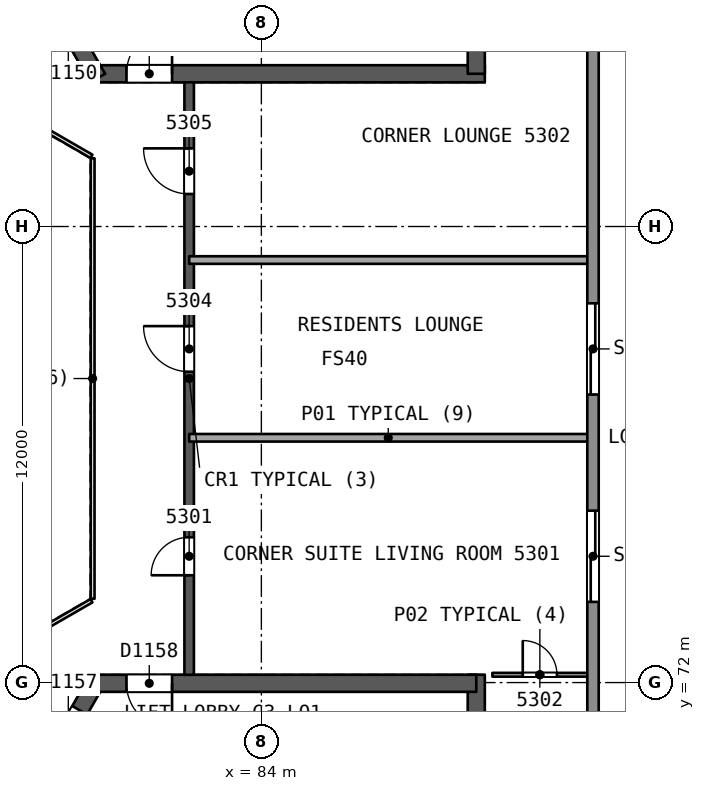
"""IFC4 building model, lengths in metres.
Left out: names, types, materials, properties, quantities, classifications, styles, units other than length and angle.
Written with IfcOpenShell. Run it as: python <this file> out.ifc"""

import sys

from ifc_helpers import new_model, si_unit, direction, frame, frame_2d, origin, place, context, subcontext, project, spatial, rectangle, extrude, element, fill, save


model = new_model("IFC4")
c1 = context("Model", 3, precision=1e-05, world=origin(), true_north=direction((0.0, 1.0)))
c2 = subcontext(c1, "Body", "Model", "MODEL_VIEW")
j1 = project(units=[si_unit("LENGTHUNIT", "METRE"), si_unit("PLANEANGLEUNIT", "RADIAN")], contexts=[c1])
p1 = place(None, origin())
s1 = spatial("IfcSite", under=j1, at=p1, CompositionType="ELEMENT")
p2 = place(p1, origin())
s2 = spatial("IfcBuilding", under=s1, at=p2, CompositionType="ELEMENT")
p3 = place(p2, frame((0.0, 0.0, 216.9)))
s3 = spatial("IfcBuildingStorey", under=s2, at=p3, CompositionType="ELEMENT", Elevation=216.9)
p4 = place(p3, frame((79.63, 88.019, 0.0), z_axis=(0.0, 0.0, 1.0), x_axis=(1.0, 0.0, 0.0)))
e1 = element("IfcWall", 1, at=p4, inside=s3, PredefinedType="SHEAR", context=c2, shape_type="SweptSolid", body=[
    extrude(rectangle(XDim=10.25, YDim=0.45, at=frame_2d((5.125, 0.0))), origin(), (0.0, 0.0, 1.0), 3.7),
])
p5 = place(p4, frame((0.82, 0.0, 0.0)))
e2 = element("IfcOpeningElement", 2, at=p5, cuts=e1, PredefinedType="OPENING", context=c2, shape_type="SweptSolid", body=[
    extrude(rectangle(XDim=1.2, YDim=2.1, at=frame_2d((0.6, 1.05))), frame((0.0, 0.235, 0.0), z_axis=(0.0, -1.0, 0.0), x_axis=(1.0, 0.0, 0.0)), (0.0, 0.0, 1.0), 0.471),
])
p6 = place(p3, frame((89.655, 88.019, 0.0), z_axis=(0.0, 0.0, 1.0), x_axis=(0.0, 1.0, 0.0)))
e3 = element("IfcWall", 3, at=p6, inside=s3, PredefinedType="SHEAR", context=c2, shape_type="SweptSolid", body=[
    extrude(rectangle(XDim=14.108, YDim=0.45, at=frame_2d((7.054, 0.0))), origin(), (0.0, 0.0, 1.0), 3.7),
])
p7 = place(p3, frame((74.617, 96.701, 0.0), z_axis=(0.0, 0.0, 1.0), x_axis=(0.499994385119, -0.866028645513, 0.0)))
e4 = element("IfcWall", 4, at=p7, inside=s3, PredefinedType="SHEAR", context=c2, shape_type="SweptSolid", body=[
    extrude(rectangle(XDim=10.155, YDim=0.45, at=frame_2d((5.077, 0.0))), origin(), (0.0, 0.0, 1.0), 3.7),
])
p8 = place(p7, frame((8.005, 0.0, 0.0)))
e5 = element("IfcOpeningElement", 5, at=p8, cuts=e4, PredefinedType="OPENING", context=c2, shape_type="SweptSolid", body=[
    extrude(rectangle(XDim=1.2, YDim=2.1, at=frame_2d((0.6, 1.05))), frame((0.0, 0.235, 0.0), z_axis=(0.0, -1.0, 0.0), x_axis=(1.0, 0.0, 0.0)), (0.0, 0.0, 1.0), 0.471),
])
p9 = place(p3, frame((79.63, 71.981, 0.0), z_axis=(0.0, 0.0, 1.0), x_axis=(-0.500002171595, -0.86602415001, 0.0)))
e6 = element("IfcWall", 6, at=p9, inside=s3, PredefinedType="SHEAR", context=c2, shape_type="SweptSolid", body=[
    extrude(rectangle(XDim=10.25, YDim=0.45, at=frame_2d((5.125, 0.0))), origin(), (0.0, 0.0, 1.0), 3.7),
])
p10 = place(p9, frame((0.82, 0.0, 0.0)))
e7 = element("IfcOpeningElement", 7, at=p10, cuts=e6, PredefinedType="OPENING", context=c2, shape_type="SweptSolid", body=[
    extrude(rectangle(XDim=1.2, YDim=2.1, at=frame_2d((0.6, 1.05))), frame((0.0, 0.235, 0.0), z_axis=(0.0, -1.0, 0.0), x_axis=(1.0, 0.0, 0.0)), (0.0, 0.0, 1.0), 0.471),
])
p11 = place(p3, frame((89.655, 58.002, 0.0), z_axis=(0.0, 0.0, 1.0), x_axis=(0.0, 1.0, 0.0)))
e8 = element("IfcWall", 8, at=p11, inside=s3, PredefinedType="SHEAR", context=c2, shape_type="SweptSolid", body=[
    extrude(rectangle(XDim=14.204, YDim=0.45, at=frame_2d((7.102, 0.0))), origin(), (0.0, 0.0, 1.0), 3.7),
])
p12 = place(p3, frame((89.655, 71.981, 0.0), z_axis=(0.0, 0.0, 1.0), x_axis=(-1.0, 0.0, 0.0)))
e9 = element("IfcWall", 9, at=p12, inside=s3, PredefinedType="SHEAR", context=c2, shape_type="SweptSolid", body=[
    extrude(rectangle(XDim=10.155, YDim=0.45, at=frame_2d((5.078, 0.0))), origin(), (0.0, 0.0, 1.0), 3.7),
])
p13 = place(p12, frame((8.005, 0.0, 0.0)))
e10 = element("IfcOpeningElement", 10, at=p13, cuts=e9, PredefinedType="OPENING", context=c2, shape_type="SweptSolid", body=[
    extrude(rectangle(XDim=1.2, YDim=2.1, at=frame_2d((0.6, 1.05))), frame((0.0, 0.235, 0.0), z_axis=(0.0, -1.0, 0.0), x_axis=(1.0, 0.0, 0.0)), (0.0, 0.0, 1.0), 0.471),
])
p14 = place(p3, frame((82.1, 72.206, 0.0), z_axis=(0.0, 0.0, 1.0), x_axis=(0.0, 1.0, 0.0)))
e11 = element("IfcWall", 11, at=p14, inside=s3, PredefinedType="SHEAR", context=c2, shape_type="SweptSolid", body=[
    extrude(rectangle(XDim=15.588, YDim=0.25, at=frame_2d((7.794, 0.0))), origin(), (0.0, 0.0, 1.0), 3.3),
])
p15 = place(p14, frame((2.618, 0.0, 0.0)))
e12 = element("IfcOpeningElement", 12, at=p15, cuts=e11, PredefinedType="OPENING", context=c2, shape_type="SweptSolid", body=[
    extrude(rectangle(XDim=1.0, YDim=2.1, at=frame_2d((0.5, 1.05))), frame((0.0, 0.135, 0.0), z_axis=(0.0, -1.0, 0.0), x_axis=(1.0, 0.0, 0.0)), (0.0, 0.0, 1.0), 0.271),
])
p16 = place(p14, frame((7.974, 0.0, 0.0)))
e13 = element("IfcOpeningElement", 13, at=p16, cuts=e11, PredefinedType="OPENING", context=c2, shape_type="SweptSolid", body=[
    extrude(rectangle(XDim=1.2, YDim=2.4, at=frame_2d((0.6, 1.2))), frame((0.0, 0.135, 0.0), z_axis=(0.0, -1.0, 0.0), x_axis=(1.0, 0.0, 0.0)), (0.0, 0.0, 1.0), 0.271),
])
p17 = place(p14, frame((12.65, 0.0, 0.0)))
e14 = element("IfcOpeningElement", 14, at=p17, cuts=e11, PredefinedType="OPENING", context=c2, shape_type="SweptSolid", body=[
    extrude(rectangle(XDim=1.2, YDim=2.4, at=frame_2d((0.6, 1.2))), frame((0.0, 0.135, 0.0), z_axis=(0.0, -1.0, 0.0), x_axis=(1.0, 0.0, 0.0)), (0.0, 0.0, 1.0), 0.271),
])
p18 = place(p3, frame((90.079, 72.206, 0.0), z_axis=(0.0, 0.0, 1.0), x_axis=(1.0, 0.0, 0.0)))
e15 = element("IfcWall", 15, at=p18, inside=s3, PredefinedType="PARTITIONING", context=c2, shape_type="SweptSolid", body=[
    extrude(rectangle(XDim=2.499, YDim=0.1, at=frame_2d((1.249, 0.0))), origin(), (0.0, 0.0, 1.0), 3.3),
])
p19 = place(p18, frame((0.799, 0.0, 0.0)))
e16 = element("IfcOpeningElement", 16, at=p19, cuts=e15, PredefinedType="OPENING", context=c2, shape_type="SweptSolid", body=[
    extrude(rectangle(XDim=0.9, YDim=2.1, at=frame_2d((0.45, 1.05))), frame((0.0, 0.061, 0.0), z_axis=(0.0, -1.0, 0.0), x_axis=(1.0, 0.0, 0.0)), (0.0, 0.0, 1.0), 0.121),
])
for number, where, z_axis, x_axis in (
    (17, (92.578, 78.441, 0.0), (0.0, 0.0, 1.0), (-1.0, 0.0, 0.0)),
    (18, (92.578, 83.118, 0.0), (0.0, 0.0, 1.0), (-1.0, 0.0, 0.0)),
):
    element("IfcWall", number, at=place(p3, frame(where, z_axis=z_axis, x_axis=x_axis)), inside=s3, PredefinedType="PARTITIONING", context=c2, shape_type="SweptSolid", body=[
        extrude(rectangle(XDim=10.478, YDim=0.2, at=frame_2d((5.239, 0.0))), origin(), (0.0, 0.0, 1.0), 3.3),
    ])
p20 = place(p3, frame((92.727, 105.489, 0.0), z_axis=(0.0, 0.0, 1.0), x_axis=(0.0, -1.0, 0.0)))
e19 = element("IfcWall", 19, at=p20, inside=s3, PredefinedType="SOLIDWALL", context=c2, shape_type="SweptSolid", body=[
    extrude(rectangle(XDim=50.977, YDim=0.3, at=frame_2d((25.489, 0.0))), origin(), (0.0, 0.0, 1.0), 3.3),
])
p21 = place(p20, frame((9.942, 0.0, 0.0)))
e20 = element("IfcOpeningElement", 20, at=p21, cuts=e19, PredefinedType="OPENING", context=c2, shape_type="SweptSolid", body=[
    extrude(rectangle(XDim=2.4, YDim=2.4, at=frame_2d((1.2, 1.2))), frame((0.0, 0.161, 0.0), z_axis=(0.0, -1.0, 0.0), x_axis=(1.0, 0.0, 0.0)), (0.0, 0.0, 1.0), 0.321),
])
p22 = place(p20, frame((28.965, 0.0, 0.0)))
e21 = element("IfcOpeningElement", 21, at=p22, cuts=e19, PredefinedType="OPENING", context=c2, shape_type="SweptSolid", body=[
    extrude(rectangle(XDim=2.4, YDim=2.4, at=frame_2d((1.2, 1.2))), frame((0.0, 0.161, 0.0), z_axis=(0.0, -1.0, 0.0), x_axis=(1.0, 0.0, 0.0)), (0.0, 0.0, 1.0), 0.321),
])
p23 = place(p20, frame((39.656, 0.0, 0.0)))
e22 = element("IfcOpeningElement", 22, at=p23, cuts=e19, PredefinedType="OPENING", context=c2, shape_type="SweptSolid", body=[
    extrude(rectangle(XDim=2.4, YDim=2.4, at=frame_2d((1.2, 1.2))), frame((0.0, 0.161, 0.0), z_axis=(0.0, -1.0, 0.0), x_axis=(1.0, 0.0, 0.0)), (0.0, 0.0, 1.0), 0.321),
])
p24 = place(p20, frame((23.509, 0.0, 0.0)))
e23 = element("IfcOpeningElement", 23, at=p24, cuts=e19, PredefinedType="OPENING", context=c2, shape_type="SweptSolid", body=[
    extrude(rectangle(XDim=2.4, YDim=2.4, at=frame_2d((1.2, 1.2))), frame((0.0, 0.161, 0.0), z_axis=(0.0, -1.0, 0.0), x_axis=(1.0, 0.0, 0.0)), (0.0, 0.0, 1.0), 0.321),
])
p25 = place(p3, frame((44.063, 82.607, 0.0), z_axis=(0.0, 0.0, 1.0), x_axis=(0.866024402399, 0.500001734447, 0.0)))
e24 = element("IfcWall", 24, at=p25, inside=s3, PredefinedType="SOLIDWALL", context=c2, shape_type="SweptSolid", body=[
    extrude(rectangle(XDim=50.977, YDim=0.3, at=frame_2d((25.488, 0.0))), origin(), (0.0, 0.0, 1.0), 3.3),
])
p26 = place(p25, frame((24.444, 0.0, 0.0)))
e25 = element("IfcOpeningElement", 25, at=p26, cuts=e24, PredefinedType="OPENING", context=c2, shape_type="SweptSolid", body=[
    extrude(rectangle(XDim=2.4, YDim=2.4, at=frame_2d((1.2, 1.2))), frame((0.0, 0.161, 0.0), z_axis=(0.0, -1.0, 0.0), x_axis=(1.0, 0.0, 0.0)), (0.0, 0.0, 1.0), 0.321),
])
p27 = place(p25, frame((29.121, 0.0, 0.0)))
e26 = element("IfcOpeningElement", 26, at=p27, cuts=e24, PredefinedType="OPENING", context=c2, shape_type="SweptSolid", body=[
    extrude(rectangle(XDim=2.4, YDim=2.4, at=frame_2d((1.2, 1.2))), frame((0.0, 0.161, 0.0), z_axis=(0.0, -1.0, 0.0), x_axis=(1.0, 0.0, 0.0)), (0.0, 0.0, 1.0), 0.321),
])
p28 = place(p25, frame((39.656, 0.0, 0.0)))
e27 = element("IfcOpeningElement", 27, at=p28, cuts=e24, PredefinedType="OPENING", context=c2, shape_type="SweptSolid", body=[
    extrude(rectangle(XDim=2.4, YDim=2.4, at=frame_2d((1.2, 1.2))), frame((0.0, 0.161, 0.0), z_axis=(0.0, -1.0, 0.0), x_axis=(1.0, 0.0, 0.0)), (0.0, 0.0, 1.0), 0.321),
])
p29 = place(p25, frame((19.612, 0.0, 0.0)))
e28 = element("IfcOpeningElement", 28, at=p29, cuts=e24, PredefinedType="OPENING", context=c2, shape_type="SweptSolid", body=[
    extrude(rectangle(XDim=2.4, YDim=2.4, at=frame_2d((1.2, 1.2))), frame((0.0, 0.161, 0.0), z_axis=(0.0, -1.0, 0.0), x_axis=(1.0, 0.0, 0.0)), (0.0, 0.0, 1.0), 0.321),
])
p30 = place(p25, frame((8.885, 0.0, 0.0)))
e29 = element("IfcOpeningElement", 29, at=p30, cuts=e24, PredefinedType="OPENING", context=c2, shape_type="SweptSolid", body=[
    extrude(rectangle(XDim=2.4, YDim=2.4, at=frame_2d((1.2, 1.2))), frame((0.0, 0.161, 0.0), z_axis=(0.0, -1.0, 0.0), x_axis=(1.0, 0.0, 0.0)), (0.0, 0.0, 1.0), 0.321),
])
p31 = place(p3, frame((88.21, 51.904, 0.0), z_axis=(0.0, 0.0, 1.0), x_axis=(-0.866024402399, 0.500001734447, 0.0)))
e30 = element("IfcWall", 30, at=p31, inside=s3, PredefinedType="SOLIDWALL", context=c2, shape_type="SweptSolid", body=[
    extrude(rectangle(XDim=50.977, YDim=0.3, at=frame_2d((25.488, 0.0))), origin(), (0.0, 0.0, 1.0), 3.3),
])
p32 = place(p31, frame((24.756, 0.0, 0.0)))
e31 = element("IfcOpeningElement", 31, at=p32, cuts=e30, PredefinedType="OPENING", context=c2, shape_type="SweptSolid", body=[
    extrude(rectangle(XDim=2.4, YDim=2.4, at=frame_2d((1.2, 1.2))), frame((0.0, 0.161, 0.0), z_axis=(0.0, -1.0, 0.0), x_axis=(1.0, 0.0, 0.0)), (0.0, 0.0, 1.0), 0.321),
])
p33 = place(p31, frame((19.612, 0.0, 0.0)))
e32 = element("IfcOpeningElement", 32, at=p33, cuts=e30, PredefinedType="OPENING", context=c2, shape_type="SweptSolid", body=[
    extrude(rectangle(XDim=2.4, YDim=2.4, at=frame_2d((1.2, 1.2))), frame((0.0, 0.161, 0.0), z_axis=(0.0, -1.0, 0.0), x_axis=(1.0, 0.0, 0.0)), (0.0, 0.0, 1.0), 0.321),
])
p34 = place(p31, frame((8.885, 0.0, 0.0)))
e33 = element("IfcOpeningElement", 33, at=p34, cuts=e30, PredefinedType="OPENING", context=c2, shape_type="SweptSolid", body=[
    extrude(rectangle(XDim=2.4, YDim=2.4, at=frame_2d((1.2, 1.2))), frame((0.0, 0.161, 0.0), z_axis=(0.0, -1.0, 0.0), x_axis=(1.0, 0.0, 0.0)), (0.0, 0.0, 1.0), 0.321),
])
p35 = place(p31, frame((38.323, 0.0, 0.0)))
e34 = element("IfcOpeningElement", 34, at=p35, cuts=e30, PredefinedType="OPENING", context=c2, shape_type="SweptSolid", body=[
    extrude(rectangle(XDim=2.4, YDim=2.4, at=frame_2d((1.2, 1.2))), frame((0.0, 0.161, 0.0), z_axis=(0.0, -1.0, 0.0), x_axis=(1.0, 0.0, 0.0)), (0.0, 0.0, 1.0), 0.321),
])
p36 = place(p3, frame((79.56, 74.206, 0.0), z_axis=(0.0, 0.0, 1.0), x_axis=(0.0, 1.0, 0.0)))
e35 = element("IfcWall", 35, at=p36, inside=s3, PredefinedType="PARTITIONING", context=c2, shape_type="SweptSolid", body=[
    extrude(rectangle(XDim=11.588, YDim=0.1, at=frame_2d((5.794, 0.0))), origin(), (0.0, 0.0, 1.0), 3.3),
])
for number, where, z_axis, x_axis in (
    (36, (79.53, 85.846, 0.0), (0.0, 0.0, 1.0), (-0.866, 0.5, 0.0)),
    (37, (77.798, 73.154, 0.0), (0.0, 0.0, 1.0), (0.866, 0.5, 0.0)),
):
    element("IfcWall", number, at=place(p3, frame(where, z_axis=z_axis, x_axis=x_axis)), inside=s3, PredefinedType="PARTITIONING", context=c2, shape_type="SweptSolid", body=[
        extrude(rectangle(XDim=2.0, YDim=0.1, at=frame_2d((1.0, 0.0))), origin(), (0.0, 0.0, 1.0), 3.3),
    ])
p37 = place(p15, origin())
e38 = element("IfcDoor", 38, at=p37, inside=s3, OperationType="SINGLE_SWING_LEFT", PredefinedType="NOTDEFINED", context=c2, shape_type="SweptSolid", body=[
    extrude(rectangle(XDim=1.0, YDim=2.1, at=frame_2d((0.5, 1.05))), frame((0.0, 0.025, 0.0), z_axis=(0.0, -1.0, 0.0), x_axis=(1.0, 0.0, 0.0)), (0.0, 0.0, 1.0), 0.05),
])
fill(e12, e38)
p38 = place(p19, origin())
e39 = element("IfcDoor", 39, at=p38, inside=s3, OperationType="SINGLE_SWING_LEFT", PredefinedType="NOTDEFINED", context=c2, shape_type="SweptSolid", body=[
    extrude(rectangle(XDim=0.9, YDim=2.1, at=frame_2d((0.45, 1.05))), frame((0.0, 0.025, 0.0), z_axis=(0.0, -1.0, 0.0), x_axis=(1.0, 0.0, 0.0)), (0.0, 0.0, 1.0), 0.05),
])
fill(e16, e39)
p39 = place(p16, origin())
e40 = element("IfcDoor", 40, at=p39, inside=s3, OperationType="SINGLE_SWING_RIGHT", PredefinedType="NOTDEFINED", context=c2, shape_type="SweptSolid", body=[
    extrude(rectangle(XDim=1.2, YDim=2.4, at=frame_2d((0.6, 1.2))), frame((0.0, 0.025, 0.0), z_axis=(0.0, -1.0, 0.0), x_axis=(1.0, 0.0, 0.0)), (0.0, 0.0, 1.0), 0.05),
])
fill(e13, e40)
p40 = place(p17, origin())
e41 = element("IfcDoor", 41, at=p40, inside=s3, OperationType="SINGLE_SWING_RIGHT", PredefinedType="NOTDEFINED", context=c2, shape_type="SweptSolid", body=[
    extrude(rectangle(XDim=1.2, YDim=2.4, at=frame_2d((0.6, 1.2))), frame((0.0, 0.025, 0.0), z_axis=(0.0, -1.0, 0.0), x_axis=(1.0, 0.0, 0.0)), (0.0, 0.0, 1.0), 0.05),
])
fill(e14, e41)
p41 = place(p22, origin())
e42 = element("IfcDoor", 42, at=p41, inside=s3, OperationType="SLIDING_TO_RIGHT", PredefinedType="NOTDEFINED", context=c2, shape_type="SweptSolid", body=[
    extrude(rectangle(XDim=2.4, YDim=2.4, at=frame_2d((1.2, 1.2))), frame((0.0, 0.025, 0.0), z_axis=(0.0, -1.0, 0.0), x_axis=(1.0, 0.0, 0.0)), (0.0, 0.0, 1.0), 0.05),
])
fill(e21, e42)
p42 = place(p24, origin())
e43 = element("IfcDoor", 43, at=p42, inside=s3, OperationType="SLIDING_TO_RIGHT", PredefinedType="NOTDEFINED", context=c2, shape_type="SweptSolid", body=[
    extrude(rectangle(XDim=2.4, YDim=2.4, at=frame_2d((1.2, 1.2))), frame((0.0, 0.025, 0.0), z_axis=(0.0, -1.0, 0.0), x_axis=(1.0, 0.0, 0.0)), (0.0, 0.0, 1.0), 0.05),
])
fill(e23, e43)
p43 = place(p5, origin())
e44 = element("IfcDoor", 44, at=p43, inside=s3, OperationType="SINGLE_SWING_RIGHT", PredefinedType="NOTDEFINED", context=c2, shape_type="SweptSolid", body=[
    extrude(rectangle(XDim=1.2, YDim=2.1, at=frame_2d((0.6, 1.05))), frame((0.0, 0.025, 0.0), z_axis=(0.0, -1.0, 0.0), x_axis=(1.0, 0.0, 0.0)), (0.0, 0.0, 1.0), 0.05),
])
fill(e2, e44)
p44 = place(p10, origin())
e45 = element("IfcDoor", 45, at=p44, inside=s3, OperationType="SINGLE_SWING_RIGHT", PredefinedType="NOTDEFINED", context=c2, shape_type="SweptSolid", body=[
    extrude(rectangle(XDim=1.2, YDim=2.1, at=frame_2d((0.6, 1.05))), frame((0.0, 0.025, 0.0), z_axis=(0.0, -1.0, 0.0), x_axis=(1.0, 0.0, 0.0)), (0.0, 0.0, 1.0), 0.05),
])
fill(e7, e45)
p45 = place(p13, origin())
e46 = element("IfcDoor", 46, at=p45, inside=s3, OperationType="SINGLE_SWING_LEFT", PredefinedType="NOTDEFINED", context=c2, shape_type="SweptSolid", body=[
    extrude(rectangle(XDim=1.2, YDim=2.1, at=frame_2d((0.6, 1.05))), frame((0.0, 0.025, 0.0), z_axis=(0.0, -1.0, 0.0), x_axis=(1.0, 0.0, 0.0)), (0.0, 0.0, 1.0), 0.05),
])
fill(e10, e46)
save(model, sys.argv[1])
